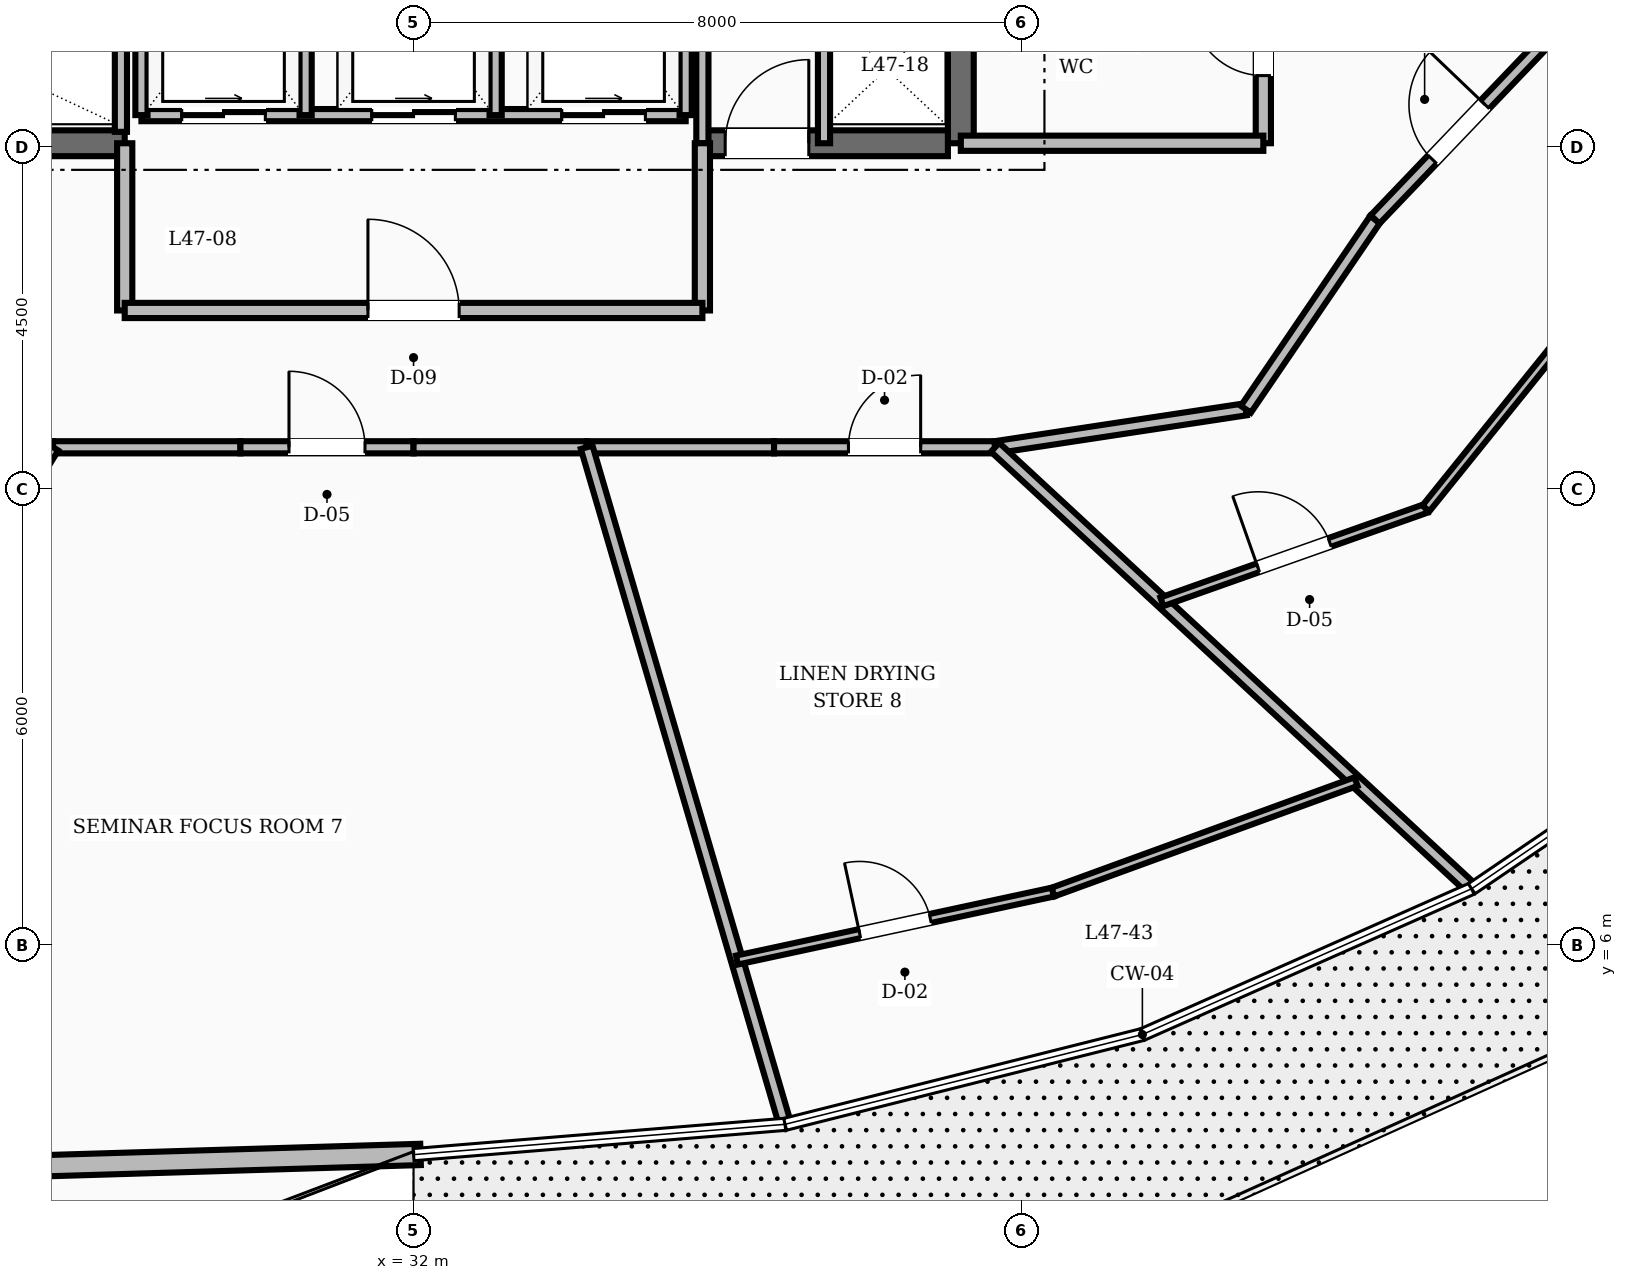
"""IFC4 building model, lengths in metres.
Left out: names, types, materials, properties, quantities, classifications, styles, units other than length and angle.
Written with IfcOpenShell. Run it as: python <this file> out.ifc"""

import sys

from ifc_helpers import new_model, si_unit, direction, frame, frame_2d, origin, place, context, subcontext, project, spatial, rectangle, extrude, element, fill, save


model = new_model("IFC4")
c1 = context("Model", 3, precision=1e-05, world=origin(), true_north=direction((0.0, 1.0)))
c2 = subcontext(c1, "Body", "Model", "MODEL_VIEW")
j1 = project(units=[si_unit("LENGTHUNIT", "METRE"), si_unit("PLANEANGLEUNIT", "RADIAN")], contexts=[c1])
p1 = place(None, origin())
s1 = spatial("IfcSite", under=j1, at=p1, CompositionType="ELEMENT")
p2 = place(p1, origin())
s2 = spatial("IfcBuilding", under=s1, at=p2, CompositionType="ELEMENT")
p3 = place(p2, frame((0.0, 0.0, 182.0)))
s3 = spatial("IfcBuildingStorey", under=s2, at=p3, CompositionType="ELEMENT", Elevation=182.0)
p4 = place(p3, frame((39.2, 16.55, 0.0), z_axis=(0.0, 0.0, 1.0), x_axis=(0.0, 1.0, 0.0)))
e1 = element("IfcWall", 1, at=p4, inside=s3, PredefinedType="SHEAR", context=c2, shape_type="SweptSolid", body=[
    extrude(rectangle(XDim=6.3, YDim=0.34, at=frame_2d((3.15, 0.0))), origin(), (0.0, 0.0, 1.0), 3.6),
])
p5 = place(p3, frame((24.97, 16.55, 0.0), z_axis=(0.0, 0.0, 1.0), x_axis=(1.0, 0.0, 0.0)))
e2 = element("IfcWall", 2, at=p5, inside=s3, PredefinedType="SHEAR", context=c2, shape_type="SweptSolid", body=[
    extrude(rectangle(XDim=3.23, YDim=0.34, at=frame_2d((1.615, 0.0))), origin(), (0.0, 0.0, 1.0), 3.6),
])
p6 = place(p3, frame((35.8, 16.55, 0.0), z_axis=(0.0, 0.0, 1.0), x_axis=(1.0, 0.0, 0.0)))
e3 = element("IfcWall", 3, at=p6, inside=s3, PredefinedType="SHEAR", context=c2, shape_type="SweptSolid", body=[
    extrude(rectangle(XDim=3.23, YDim=0.34, at=frame_2d((1.615, 0.0))), origin(), (0.0, 0.0, 1.0), 3.6),
])
p7 = place(p6, frame((0.3, 0.0, 0.0)))
e4 = element("IfcOpeningElement", 4, at=p7, cuts=e3, PredefinedType="OPENING", context=c2, shape_type="SweptSolid", body=[
    extrude(rectangle(XDim=1.1, YDim=2.1, at=frame_2d((0.55, 1.05))), frame((0.0, 0.18, 0.0), z_axis=(0.0, -1.0, 0.0), x_axis=(1.0, 0.0, 0.0)), (0.0, 0.0, 1.0), 0.36),
])
p8 = place(p3, frame((27.002, 3.094, 0.0), z_axis=(0.0, 0.0, 1.0), x_axis=(0.999546573707, 0.030110579378, 0.0)))
e5 = element("IfcWall", 5, at=p8, inside=s3, PredefinedType="STANDARD", context=c2, shape_type="SweptSolid", body=[
    extrude(rectangle(XDim=5.092, YDim=0.28, at=frame_2d((2.546, 0.0))), origin(), (0.0, 0.0, 1.0), 2.82),
])
p9 = place(p3, frame((43.18, 16.55, 0.0), z_axis=(0.0, 0.0, 1.0), x_axis=(0.0, 1.0, 0.0)))
e6 = element("IfcWall", 6, at=p9, inside=s3, PredefinedType="SOLIDWALL", context=c2, shape_type="SweptSolid", body=[
    extrude(rectangle(XDim=2.73, YDim=0.2, at=frame_2d((1.365, 0.0))), origin(), (0.0, 0.0, 1.0), 2.8),
])
p10 = place(p9, frame((0.89, 0.0, 0.0)))
e7 = element("IfcOpeningElement", 7, at=p10, cuts=e6, PredefinedType="OPENING", context=c2, shape_type="SweptSolid", body=[
    extrude(rectangle(XDim=0.95, YDim=2.1, at=frame_2d((0.475, 1.05))), frame((0.0, 0.11, 0.0), z_axis=(0.0, -1.0, 0.0), x_axis=(1.0, 0.0, 0.0)), (0.0, 0.0, 1.0), 0.22),
])
p11 = place(p3, frame((39.2, 16.55, 0.0), z_axis=(0.0, 0.0, 1.0), x_axis=(1.0, 0.0, 0.0)))
e8 = element("IfcWall", 8, at=p11, inside=s3, PredefinedType="SOLIDWALL", context=c2, shape_type="SweptSolid", body=[
    extrude(rectangle(XDim=3.98, YDim=0.2, at=frame_2d((1.99, 0.0))), origin(), (0.0, 0.0, 1.0), 2.8),
])
p12 = place(p3, frame((35.8, 16.55, 0.0), z_axis=(0.0, 0.0, 1.0), x_axis=(0.0, 1.0, 0.0)))
e9 = element("IfcWall", 9, at=p12, inside=s3, PredefinedType="SOLIDWALL", context=c2, shape_type="SweptSolid", body=[
    extrude(rectangle(XDim=3.3, YDim=0.16, at=frame_2d((1.65, 0.0))), origin(), (0.0, 0.0, 1.0), 2.8),
])
p13 = place(p3, frame((37.4, 16.55, 0.0), z_axis=(0.0, 0.0, 1.0), x_axis=(0.0, 1.0, 0.0)))
e10 = element("IfcWall", 10, at=p13, inside=s3, PredefinedType="SOLIDWALL", context=c2, shape_type="SweptSolid", body=[
    extrude(rectangle(XDim=1.75, YDim=0.16, at=frame_2d((0.875, 0.0))), origin(), (0.0, 0.0, 1.0), 2.8),
])
for number, where, z_axis, x_axis in (
    (11, (28.2, 14.35, 0.0), (0.0, 0.0, 1.0), (0.0, 1.0, 0.0)),
    (12, (35.8, 14.35, 0.0), (0.0, 0.0, 1.0), (0.0, 1.0, 0.0)),
):
    element("IfcWall", number, at=place(p3, frame(where, z_axis=z_axis, x_axis=x_axis)), inside=s3, PredefinedType="SOLIDWALL", context=c2, shape_type="SweptSolid", body=[
        extrude(rectangle(XDim=2.2, YDim=0.2, at=frame_2d((1.1, 0.0))), origin(), (0.0, 0.0, 1.0), 2.8),
    ])
p14 = place(p3, frame((28.2, 14.35, 0.0), z_axis=(0.0, 0.0, 1.0), x_axis=(1.0, 0.0, 0.0)))
e13 = element("IfcWall", 13, at=p14, inside=s3, PredefinedType="SOLIDWALL", context=c2, shape_type="SweptSolid", body=[
    extrude(rectangle(XDim=7.6, YDim=0.2, at=frame_2d((3.8, 0.0))), origin(), (0.0, 0.0, 1.0), 2.8),
])
p15 = place(p14, frame((3.2, 0.0, 0.0)))
e14 = element("IfcOpeningElement", 14, at=p15, cuts=e13, PredefinedType="OPENING", context=c2, shape_type="SweptSolid", body=[
    extrude(rectangle(XDim=1.2, YDim=2.1, at=frame_2d((0.6, 1.05))), frame((0.0, 0.11, 0.0), z_axis=(0.0, -1.0, 0.0), x_axis=(1.0, 0.0, 0.0)), (0.0, 0.0, 1.0), 0.22),
])
p16 = place(p3, frame((28.42, 16.92, 0.0), z_axis=(0.0, 0.0, 1.0), x_axis=(1.0, 0.0, 0.0)))
e15 = element("IfcWall", 15, at=p16, inside=s3, PredefinedType="SOLIDWALL", context=c2, shape_type="SweptSolid", body=[
    extrude(rectangle(XDim=7.16, YDim=0.16, at=frame_2d((3.58, 0.0))), origin(), (0.0, 0.0, 1.0), 2.8),
])
p17 = place(p16, frame((0.53, 0.0, 0.0)))
e16 = element("IfcOpeningElement", 16, at=p17, cuts=e15, PredefinedType="OPENING", context=c2, shape_type="SweptSolid", body=[
    extrude(rectangle(XDim=1.1, YDim=2.15, at=frame_2d((0.55, 1.075))), frame((0.0, 0.09, 0.0), z_axis=(0.0, -1.0, 0.0), x_axis=(1.0, 0.0, 0.0)), (0.0, 0.0, 1.0), 0.18),
])
p18 = place(p16, frame((3.03, 0.0, 0.0)))
e17 = element("IfcOpeningElement", 17, at=p18, cuts=e15, PredefinedType="OPENING", context=c2, shape_type="SweptSolid", body=[
    extrude(rectangle(XDim=1.1, YDim=2.15, at=frame_2d((0.55, 1.075))), frame((0.0, 0.09, 0.0), z_axis=(0.0, -1.0, 0.0), x_axis=(1.0, 0.0, 0.0)), (0.0, 0.0, 1.0), 0.18),
])
p19 = place(p16, frame((5.53, 0.0, 0.0)))
e18 = element("IfcOpeningElement", 18, at=p19, cuts=e15, PredefinedType="OPENING", context=c2, shape_type="SweptSolid", body=[
    extrude(rectangle(XDim=1.1, YDim=2.15, at=frame_2d((0.55, 1.075))), frame((0.0, 0.09, 0.0), z_axis=(0.0, -1.0, 0.0), x_axis=(1.0, 0.0, 0.0)), (0.0, 0.0, 1.0), 0.18),
])
for number, where, z_axis, x_axis in (
    (19, (28.42, 16.92, 0.0), (0.0, 0.0, 1.0), (0.0, 1.0, 0.0)),
    (20, (30.58, 16.92, 0.0), (0.0, 0.0, 1.0), (0.0, 1.0, 0.0)),
    (21, (33.08, 16.92, 0.0), (0.0, 0.0, 1.0), (0.0, 1.0, 0.0)),
    (22, (35.58, 16.92, 0.0), (0.0, 0.0, 1.0), (0.0, 1.0, 0.0)),
):
    element("IfcWall", number, at=place(p3, frame(where, z_axis=z_axis, x_axis=x_axis)), inside=s3, PredefinedType="SOLIDWALL", context=c2, shape_type="SweptSolid", body=[
        extrude(rectangle(XDim=2.76, YDim=0.16, at=frame_2d((1.38, 0.0))), origin(), (0.0, 0.0, 1.0), 2.8),
    ])
p20 = place(p3, frame((28.15, 16.7, 0.0), z_axis=(0.0, 0.0, 1.0), x_axis=(0.0, 1.0, 0.0)))
e23 = element("IfcWall", 23, at=p20, inside=s3, PredefinedType="SOLIDWALL", context=c2, shape_type="SweptSolid", body=[
    extrude(rectangle(XDim=6.05, YDim=0.16, at=frame_2d((3.025, 0.0))), origin(), (0.0, 0.0, 1.0), 2.8),
])
p21 = place(p3, frame((24.349, 12.55, 0.0), z_axis=(0.0, 0.0, 1.0), x_axis=(1.0, 0.0, 0.0)))
e24 = element("IfcWall", 24, at=p21, inside=s3, PredefinedType="SOLIDWALL", context=c2, shape_type="SweptSolid", body=[
    extrude(rectangle(XDim=2.908, YDim=0.16, at=frame_2d((1.454, 0.0))), origin(), (0.0, 0.0, 1.0), 2.8),
])
p22 = place(p3, frame((27.257, 12.55, 0.0), z_axis=(0.0, 0.0, 1.0), x_axis=(1.0, 0.0, 0.0)))
e25 = element("IfcWall", 25, at=p22, inside=s3, PredefinedType="SOLIDWALL", context=c2, shape_type="SweptSolid", body=[
    extrude(rectangle(XDim=2.465, YDim=0.16, at=frame_2d((1.232, 0.0))), origin(), (0.0, 0.0, 1.0), 2.8),
])
p23 = place(p3, frame((29.722, 12.55, 0.0), z_axis=(0.0, 0.0, 1.0), x_axis=(1.0, 0.0, 0.0)))
e26 = element("IfcWall", 26, at=p23, inside=s3, PredefinedType="SOLIDWALL", context=c2, shape_type="SweptSolid", body=[
    extrude(rectangle(XDim=2.278, YDim=0.16, at=frame_2d((1.139, 0.0))), origin(), (0.0, 0.0, 1.0), 2.8),
])
p24 = place(p23, frame((0.639, 0.0, 0.0)))
e27 = element("IfcOpeningElement", 27, at=p24, cuts=e26, PredefinedType="OPENING", context=c2, shape_type="SweptSolid", body=[
    extrude(rectangle(XDim=1.0, YDim=2.1, at=frame_2d((0.5, 1.05))), frame((0.0, 0.09, 0.0), z_axis=(0.0, -1.0, 0.0), x_axis=(1.0, 0.0, 0.0)), (0.0, 0.0, 1.0), 0.18),
])
p25 = place(p3, frame((32.0, 12.55, 0.0), z_axis=(0.0, 0.0, 1.0), x_axis=(1.0, 0.0, 0.0)))
e28 = element("IfcWall", 28, at=p25, inside=s3, PredefinedType="SOLIDWALL", context=c2, shape_type="SweptSolid", body=[
    extrude(rectangle(XDim=2.278, YDim=0.16, at=frame_2d((1.139, 0.0))), origin(), (0.0, 0.0, 1.0), 2.8),
])
p26 = place(p3, frame((34.278, 12.55, 0.0), z_axis=(0.0, 0.0, 1.0), x_axis=(1.0, 0.0, 0.0)))
e29 = element("IfcWall", 29, at=p26, inside=s3, PredefinedType="SOLIDWALL", context=c2, shape_type="SweptSolid", body=[
    extrude(rectangle(XDim=2.465, YDim=0.16, at=frame_2d((1.232, 0.0))), origin(), (0.0, 0.0, 1.0), 2.8),
])
p27 = place(p3, frame((36.743, 12.55, 0.0), z_axis=(0.0, 0.0, 1.0), x_axis=(1.0, 0.0, 0.0)))
e30 = element("IfcWall", 30, at=p27, inside=s3, PredefinedType="SOLIDWALL", context=c2, shape_type="SweptSolid", body=[
    extrude(rectangle(XDim=2.908, YDim=0.16, at=frame_2d((1.454, 0.0))), origin(), (0.0, 0.0, 1.0), 2.8),
])
p28 = place(p27, frame((0.979, 0.0, 0.0)))
e31 = element("IfcOpeningElement", 31, at=p28, cuts=e30, PredefinedType="OPENING", context=c2, shape_type="SweptSolid", body=[
    extrude(rectangle(XDim=0.95, YDim=2.1, at=frame_2d((0.475, 1.05))), frame((0.0, 0.09, 0.0), z_axis=(0.0, -1.0, 0.0), x_axis=(1.0, 0.0, 0.0)), (0.0, 0.0, 1.0), 0.18),
])
p29 = place(p3, frame((39.651, 12.55, 0.0), z_axis=(0.0, 0.0, 1.0), x_axis=(0.988710906508, 0.149835721217, 0.0)))
e32 = element("IfcWall", 32, at=p29, inside=s3, PredefinedType="SOLIDWALL", context=c2, shape_type="SweptSolid", body=[
    extrude(rectangle(XDim=3.337, YDim=0.16, at=frame_2d((1.668, 0.0))), origin(), (0.0, 0.0, 1.0), 2.8),
])
p30 = place(p3, frame((42.95, 13.05, 0.0), z_axis=(0.0, 0.0, 1.0), x_axis=(0.562674669208, 0.826678423955, 0.0)))
e33 = element("IfcWall", 33, at=p30, inside=s3, PredefinedType="SOLIDWALL", context=c2, shape_type="SweptSolid", body=[
    extrude(rectangle(XDim=3.021, YDim=0.16, at=frame_2d((1.511, 0.0))), origin(), (0.0, 0.0, 1.0), 2.8),
])
p31 = place(p3, frame((44.65, 15.548, 0.0), z_axis=(0.0, 0.0, 1.0), x_axis=(0.691055487108, 0.722801711216, 0.0)))
e34 = element("IfcWall", 34, at=p31, inside=s3, PredefinedType="SOLIDWALL", context=c2, shape_type="SweptSolid", body=[
    extrude(rectangle(XDim=3.184, YDim=0.16, at=frame_2d((1.592, 0.0))), origin(), (0.0, 0.0, 1.0), 2.8),
])
p32 = place(p31, frame((1.092, 0.0, 0.0)))
e35 = element("IfcOpeningElement", 35, at=p32, cuts=e34, PredefinedType="OPENING", context=c2, shape_type="SweptSolid", body=[
    extrude(rectangle(XDim=1.0, YDim=2.1, at=frame_2d((0.5, 1.05))), frame((0.0, 0.09, 0.0), z_axis=(0.0, -1.0, 0.0), x_axis=(1.0, 0.0, 0.0)), (0.0, 0.0, 1.0), 0.18),
])
p33 = place(p3, frame((39.651, 12.55, 0.0), z_axis=(0.0, 0.0, 1.0), x_axis=(0.733614757442, -0.679565587462, 0.0)))
e36 = element("IfcWall", 36, at=p33, inside=s3, PredefinedType="SOLIDWALL", context=c2, shape_type="SweptSolid", body=[
    extrude(rectangle(XDim=8.497, YDim=0.16, at=frame_2d((4.248, 0.0))), origin(), (0.0, 0.0, 1.0), 2.8),
])
p34 = place(p3, frame((41.845, 10.517, 0.0), z_axis=(0.0, 0.0, 1.0), x_axis=(0.942788299014, 0.333391996369, 0.0)))
e37 = element("IfcWall", 37, at=p34, inside=s3, PredefinedType="PARTITIONING", context=c2, shape_type="SweptSolid", body=[
    extrude(rectangle(XDim=3.684, YDim=0.12, at=frame_2d((1.842, 0.0))), origin(), (0.0, 0.0, 1.0), 2.8),
])
p35 = place(p34, frame((1.342, 0.0, 0.0)))
e38 = element("IfcOpeningElement", 38, at=p35, cuts=e37, PredefinedType="OPENING", context=c2, shape_type="SweptSolid", body=[
    extrude(rectangle(XDim=1.0, YDim=2.1, at=frame_2d((0.5, 1.05))), frame((0.0, 0.07, 0.0), z_axis=(0.0, -1.0, 0.0), x_axis=(1.0, 0.0, 0.0)), (0.0, 0.0, 1.0), 0.14),
])
p36 = place(p3, frame((45.319, 11.746, 0.0), z_axis=(0.0, 0.0, 1.0), x_axis=(0.627490559783, 0.778624169534, 0.0)))
e39 = element("IfcWall", 39, at=p36, inside=s3, PredefinedType="PARTITIONING", context=c2, shape_type="SweptSolid", body=[
    extrude(rectangle(XDim=3.499, YDim=0.12, at=frame_2d((1.75, 0.0))), origin(), (0.0, 0.0, 1.0), 2.8),
])
p37 = place(p3, frame((27.257, 12.55, 0.0), z_axis=(0.0, 0.0, 1.0), x_axis=(-0.523144397067, -0.85224406118, 0.0)))
e40 = element("IfcWall", 40, at=p37, inside=s3, PredefinedType="SOLIDWALL", context=c2, shape_type="SweptSolid", body=[
    extrude(rectangle(XDim=9.623, YDim=0.16, at=frame_2d((4.811, 0.0))), origin(), (0.0, 0.0, 1.0), 2.8),
])
p38 = place(p3, frame((34.278, 12.55, 0.0), z_axis=(0.0, 0.0, 1.0), x_axis=(0.281249860715, -0.959634574121, 0.0)))
e41 = element("IfcWall", 41, at=p38, inside=s3, PredefinedType="SOLIDWALL", context=c2, shape_type="SweptSolid", body=[
    extrude(rectangle(XDim=9.232, YDim=0.16, at=frame_2d((4.616, 0.0))), origin(), (0.0, 0.0, 1.0), 2.8),
])
p39 = place(p3, frame((36.255, 5.804, 0.0), z_axis=(0.0, 0.0, 1.0), x_axis=(0.977643362971, 0.210269957053, 0.0)))
e42 = element("IfcWall", 42, at=p39, inside=s3, PredefinedType="PARTITIONING", context=c2, shape_type="SweptSolid", body=[
    extrude(rectangle(XDim=4.253, YDim=0.12, at=frame_2d((2.126, 0.0))), origin(), (0.0, 0.0, 1.0), 2.8),
])
p40 = place(p39, frame((1.652, 0.0, 0.0)))
e43 = element("IfcOpeningElement", 43, at=p40, cuts=e42, PredefinedType="OPENING", context=c2, shape_type="SweptSolid", body=[
    extrude(rectangle(XDim=0.95, YDim=2.1, at=frame_2d((0.475, 1.05))), frame((0.0, 0.07, 0.0), z_axis=(0.0, -1.0, 0.0), x_axis=(1.0, 0.0, 0.0)), (0.0, 0.0, 1.0), 0.14),
])
p41 = place(p3, frame((40.413, 6.698, 0.0), z_axis=(0.0, 0.0, 1.0), x_axis=(0.939549590204, 0.342412861247, 0.0)))
e44 = element("IfcWall", 44, at=p41, inside=s3, PredefinedType="PARTITIONING", context=c2, shape_type="SweptSolid", body=[
    extrude(rectangle(XDim=4.243, YDim=0.12, at=frame_2d((2.122, 0.0))), origin(), (0.0, 0.0, 1.0), 2.8),
])
p42 = place(p10, origin())
e45 = element("IfcDoor", 45, at=p42, inside=s3, OperationType="SINGLE_SWING_RIGHT", PredefinedType="DOOR", context=c2, shape_type="SweptSolid", body=[
    extrude(rectangle(XDim=0.95, YDim=2.1, at=frame_2d((0.475, 1.05))), frame((0.0, 0.025, 0.0), z_axis=(0.0, -1.0, 0.0), x_axis=(1.0, 0.0, 0.0)), (0.0, 0.0, 1.0), 0.05),
])
fill(e7, e45)
p43 = place(p7, origin())
e46 = element("IfcDoor", 46, at=p43, inside=s3, OperationType="SINGLE_SWING_RIGHT", PredefinedType="DOOR", context=c2, shape_type="SweptSolid", body=[
    extrude(rectangle(XDim=1.1, YDim=2.1, at=frame_2d((0.55, 1.05))), frame((0.0, 0.025, 0.0), z_axis=(0.0, -1.0, 0.0), x_axis=(1.0, 0.0, 0.0)), (0.0, 0.0, 1.0), 0.05),
])
fill(e4, e46)
p44 = place(p15, origin())
e47 = element("IfcDoor", 47, at=p44, inside=s3, OperationType="SINGLE_SWING_LEFT", PredefinedType="DOOR", context=c2, shape_type="SweptSolid", body=[
    extrude(rectangle(XDim=1.2, YDim=2.1, at=frame_2d((0.6, 1.05))), frame((0.0, 0.025, 0.0), z_axis=(0.0, -1.0, 0.0), x_axis=(1.0, 0.0, 0.0)), (0.0, 0.0, 1.0), 0.05),
])
fill(e14, e47)
p45 = place(p17, origin())
e48 = element("IfcDoor", 48, at=p45, inside=s3, OperationType="SLIDING_TO_RIGHT", PredefinedType="DOOR", context=c2, shape_type="SweptSolid", body=[
    extrude(rectangle(XDim=1.1, YDim=2.15, at=frame_2d((0.55, 1.075))), frame((0.0, 0.025, 0.0), z_axis=(0.0, -1.0, 0.0), x_axis=(1.0, 0.0, 0.0)), (0.0, 0.0, 1.0), 0.05),
])
fill(e16, e48)
p46 = place(p18, origin())
e49 = element("IfcDoor", 49, at=p46, inside=s3, OperationType="SLIDING_TO_RIGHT", PredefinedType="DOOR", context=c2, shape_type="SweptSolid", body=[
    extrude(rectangle(XDim=1.1, YDim=2.15, at=frame_2d((0.55, 1.075))), frame((0.0, 0.025, 0.0), z_axis=(0.0, -1.0, 0.0), x_axis=(1.0, 0.0, 0.0)), (0.0, 0.0, 1.0), 0.05),
])
fill(e17, e49)
p47 = place(p19, origin())
e50 = element("IfcDoor", 50, at=p47, inside=s3, OperationType="SLIDING_TO_RIGHT", PredefinedType="DOOR", context=c2, shape_type="SweptSolid", body=[
    extrude(rectangle(XDim=1.1, YDim=2.15, at=frame_2d((0.55, 1.075))), frame((0.0, 0.025, 0.0), z_axis=(0.0, -1.0, 0.0), x_axis=(1.0, 0.0, 0.0)), (0.0, 0.0, 1.0), 0.05),
])
fill(e18, e50)
p48 = place(p32, origin())
e51 = element("IfcDoor", 51, at=p48, inside=s3, OperationType="SINGLE_SWING_RIGHT", PredefinedType="DOOR", context=c2, shape_type="SweptSolid", body=[
    extrude(rectangle(XDim=1.0, YDim=2.1, at=frame_2d((0.5, 1.05))), frame((0.0, 0.025, 0.0), z_axis=(0.0, -1.0, 0.0), x_axis=(1.0, 0.0, 0.0)), (0.0, 0.0, 1.0), 0.05),
])
fill(e35, e51)
p49 = place(p35, origin())
e52 = element("IfcDoor", 52, at=p49, inside=s3, OperationType="SINGLE_SWING_LEFT", PredefinedType="DOOR", context=c2, shape_type="SweptSolid", body=[
    extrude(rectangle(XDim=1.0, YDim=2.1, at=frame_2d((0.5, 1.05))), frame((0.0, 0.025, 0.0), z_axis=(0.0, -1.0, 0.0), x_axis=(1.0, 0.0, 0.0)), (0.0, 0.0, 1.0), 0.05),
])
fill(e38, e52)
p50 = place(p24, origin())
e53 = element("IfcDoor", 53, at=p50, inside=s3, OperationType="SINGLE_SWING_LEFT", PredefinedType="DOOR", context=c2, shape_type="SweptSolid", body=[
    extrude(rectangle(XDim=1.0, YDim=2.1, at=frame_2d((0.5, 1.05))), frame((0.0, 0.025, 0.0), z_axis=(0.0, -1.0, 0.0), x_axis=(1.0, 0.0, 0.0)), (0.0, 0.0, 1.0), 0.05),
])
fill(e27, e53)
p51 = place(p28, origin())
e54 = element("IfcDoor", 54, at=p51, inside=s3, OperationType="SINGLE_SWING_RIGHT", PredefinedType="DOOR", context=c2, shape_type="SweptSolid", body=[
    extrude(rectangle(XDim=0.95, YDim=2.1, at=frame_2d((0.475, 1.05))), frame((0.0, 0.025, 0.0), z_axis=(0.0, -1.0, 0.0), x_axis=(1.0, 0.0, 0.0)), (0.0, 0.0, 1.0), 0.05),
])
fill(e31, e54)
p52 = place(p40, origin())
e55 = element("IfcDoor", 55, at=p52, inside=s3, OperationType="SINGLE_SWING_LEFT", PredefinedType="DOOR", context=c2, shape_type="SweptSolid", body=[
    extrude(rectangle(XDim=0.95, YDim=2.1, at=frame_2d((0.475, 1.05))), frame((0.0, 0.025, 0.0), z_axis=(0.0, -1.0, 0.0), x_axis=(1.0, 0.0, 0.0)), (0.0, 0.0, 1.0), 0.05),
])
fill(e43, e55)
save(model, sys.argv[1])
